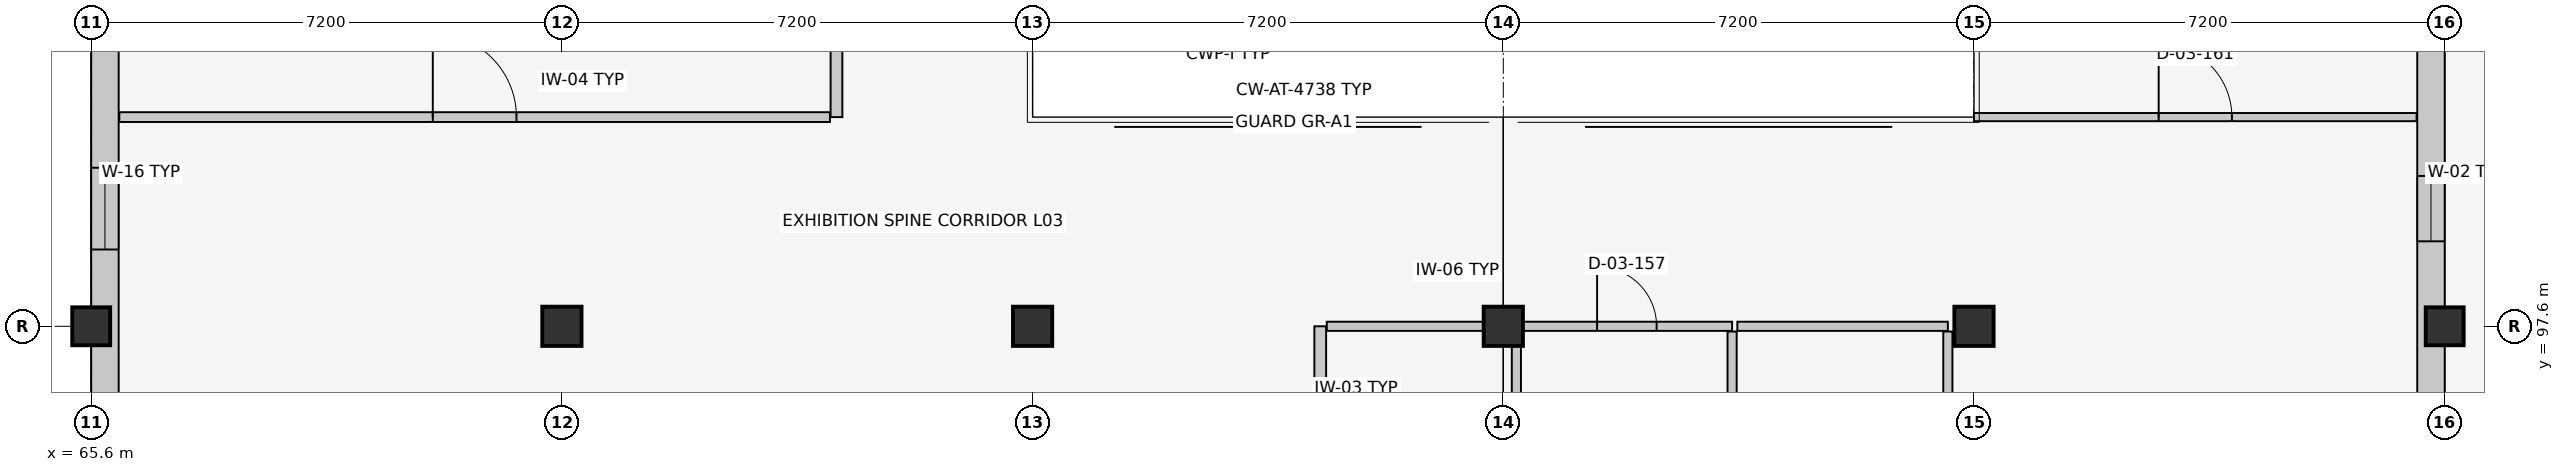
"""IFC4 building model, lengths in metres.
Left out: names, types, materials, properties, quantities, classifications, styles, units other than length and angle.
Written with IfcOpenShell. Run it as: python <this file> out.ifc"""

import sys

from ifc_helpers import new_model, si_unit, direction, frame, frame_2d, origin, origin_2d, place, context, subcontext, project, spatial, rectangle, extrude, element, fill, save


model = new_model("IFC4")
c1 = context("Model", 3, precision=1e-05, world=origin(), true_north=direction((0.0, 1.0)))
c2 = subcontext(c1, "Body", "Model", "MODEL_VIEW")
j1 = project(units=[si_unit("LENGTHUNIT", "METRE"), si_unit("PLANEANGLEUNIT", "RADIAN")], contexts=[c1])
p1 = place(None, origin())
s1 = spatial("IfcSite", under=j1, at=p1, CompositionType="ELEMENT")
p2 = place(p1, origin())
s2 = spatial("IfcBuilding", under=s1, at=p2, CompositionType="ELEMENT")
p3 = place(p2, frame((0.0, 0.0, 13.8)))
s3 = spatial("IfcBuildingStorey", under=s2, at=p3, CompositionType="ELEMENT", Elevation=13.8)
p4 = place(p3, frame((65.6, 97.6, 0.0), z_axis=(0.0, 0.0, 1.0), x_axis=(1.0, 0.0, 0.0)))
e1 = element("IfcColumn", 1, at=p4, inside=s3, PredefinedType="COLUMN", context=c2, shape_type="SweptSolid", body=[
    extrude(rectangle(XDim=0.58, YDim=0.58, at=origin_2d()), origin(), (0.0, 0.0, 1.0), 4.2),
])
for number, where, z_axis, x_axis in (
    (2, (72.8, 97.6, 0.0), (0.0, 0.0, 1.0), (1.0, 0.0, 0.0)),
    (3, (80.0, 97.6, 0.0), (0.0, 0.0, 1.0), (1.0, 0.0, 0.0)),
    (4, (87.2, 97.6, 0.0), (0.0, 0.0, 1.0), (1.0, 0.0, 0.0)),
    (5, (94.4, 97.6, 0.0), (0.0, 0.0, 1.0), (1.0, 0.0, 0.0)),
):
    element("IfcColumn", number, at=place(p3, frame(where, z_axis=z_axis, x_axis=x_axis)), inside=s3, PredefinedType="COLUMN", context=c2, shape_type="SweptSolid", body=[
        extrude(rectangle(XDim=0.6, YDim=0.6, at=origin_2d()), origin(), (0.0, 0.0, 1.0), 4.2),
    ])
p5 = place(p3, frame((101.6, 97.6, 0.0), z_axis=(0.0, 0.0, 1.0), x_axis=(1.0, 0.0, 0.0)))
e6 = element("IfcColumn", 6, at=p5, inside=s3, PredefinedType="COLUMN", context=c2, shape_type="SweptSolid", body=[
    extrude(rectangle(XDim=0.58, YDim=0.58, at=origin_2d()), origin(), (0.0, 0.0, 1.0), 4.2),
])
p6 = place(p3, frame((101.39, 112.0, 0.0), z_axis=(0.0, 0.0, 1.0), x_axis=(0.0, -1.0, 0.0)))
e7 = element("IfcWall", 7, at=p6, inside=s3, PredefinedType="SOLIDWALL", context=c2, shape_type="SweptSolid", body=[
    extrude(rectangle(XDim=21.6, YDim=0.42, at=frame_2d((10.8, 0.0))), origin(), (0.0, 0.0, 1.0), 3.215),
])
p7 = place(p6, frame((17.3, 0.0, 0.0)))
e8 = element("IfcOpeningElement", 8, at=p7, cuts=e7, PredefinedType="OPENING", context=c2, shape_type="SweptSolid", body=[
    extrude(rectangle(XDim=1.4, YDim=2.2, at=frame_2d((0.7, 1.1))), frame((0.0, 0.222, 0.0), z_axis=(0.0, -1.0, 0.0), x_axis=(1.0, 0.0, 0.0)), (0.0, 0.0, 1.0), 0.444),
])
p8 = place(p6, frame((1.08, 0.0, 0.9)))
e9 = element("IfcOpeningElement", 9, at=p8, cuts=e7, PredefinedType="OPENING", context=c2, shape_type="SweptSolid", body=[
    extrude(rectangle(XDim=1.44, YDim=1.75, at=frame_2d((0.72, 0.875))), frame((0.0, 0.222, 0.0), z_axis=(0.0, -1.0, 0.0), x_axis=(1.0, 0.0, 0.0)), (0.0, 0.0, 1.0), 0.444),
])
p9 = place(p6, frame((4.65, 0.0, 0.9)))
e10 = element("IfcOpeningElement", 10, at=p9, cuts=e7, PredefinedType="OPENING", context=c2, shape_type="SweptSolid", body=[
    extrude(rectangle(XDim=1.5, YDim=1.75, at=frame_2d((0.75, 0.875))), frame((0.0, 0.222, 0.0), z_axis=(0.0, -1.0, 0.0), x_axis=(1.0, 0.0, 0.0)), (0.0, 0.0, 1.0), 0.444),
])
p10 = place(p6, frame((8.55, 0.0, 0.9)))
e11 = element("IfcOpeningElement", 11, at=p10, cuts=e7, PredefinedType="OPENING", context=c2, shape_type="SweptSolid", body=[
    extrude(rectangle(XDim=0.9, YDim=1.35, at=frame_2d((0.45, 0.675))), frame((0.0, 0.222, 0.0), z_axis=(0.0, -1.0, 0.0), x_axis=(1.0, 0.0, 0.0)), (0.0, 0.0, 1.0), 0.444),
])
p11 = place(p6, frame((12.1, 0.0, 0.9)))
e12 = element("IfcOpeningElement", 12, at=p11, cuts=e7, PredefinedType="OPENING", context=c2, shape_type="SweptSolid", body=[
    extrude(rectangle(XDim=1.0, YDim=1.35, at=frame_2d((0.5, 0.675))), frame((0.0, 0.222, 0.0), z_axis=(0.0, -1.0, 0.0), x_axis=(1.0, 0.0, 0.0)), (0.0, 0.0, 1.0), 0.444),
])
p12 = place(p3, frame((65.81, 90.4, 0.0), z_axis=(0.0, 0.0, 1.0), x_axis=(0.0, 1.0, 0.0)))
e13 = element("IfcWall", 13, at=p12, inside=s3, PredefinedType="SOLIDWALL", context=c2, shape_type="SweptSolid", body=[
    extrude(rectangle(XDim=21.6, YDim=0.42, at=frame_2d((10.8, 0.0))), origin(), (0.0, 0.0, 1.0), 3.135),
])
p13 = place(p12, frame((1.275, 0.0, 0.9)))
e14 = element("IfcOpeningElement", 14, at=p13, cuts=e13, PredefinedType="OPENING", context=c2, shape_type="SweptSolid", body=[
    extrude(rectangle(XDim=1.05, YDim=1.6, at=frame_2d((0.525, 0.8))), frame((0.0, 0.222, 0.0), z_axis=(0.0, -1.0, 0.0), x_axis=(1.0, 0.0, 0.0)), (0.0, 0.0, 1.0), 0.444),
])
p14 = place(p12, frame((4.825, 0.0, 0.9)))
e15 = element("IfcOpeningElement", 15, at=p14, cuts=e13, PredefinedType="OPENING", context=c2, shape_type="SweptSolid", body=[
    extrude(rectangle(XDim=1.15, YDim=1.6, at=frame_2d((0.575, 0.8))), frame((0.0, 0.222, 0.0), z_axis=(0.0, -1.0, 0.0), x_axis=(1.0, 0.0, 0.0)), (0.0, 0.0, 1.0), 0.444),
])
p15 = place(p12, frame((8.375, 0.0, 0.9)))
e16 = element("IfcOpeningElement", 16, at=p15, cuts=e13, PredefinedType="OPENING", context=c2, shape_type="SweptSolid", body=[
    extrude(rectangle(XDim=1.25, YDim=1.6, at=frame_2d((0.625, 0.8))), frame((0.0, 0.222, 0.0), z_axis=(0.0, -1.0, 0.0), x_axis=(1.0, 0.0, 0.0)), (0.0, 0.0, 1.0), 0.444),
])
p16 = place(p12, frame((11.91, 0.0, 0.9)))
e17 = element("IfcOpeningElement", 17, at=p16, cuts=e13, PredefinedType="OPENING", context=c2, shape_type="SweptSolid", body=[
    extrude(rectangle(XDim=1.38, YDim=1.6, at=frame_2d((0.69, 0.8))), frame((0.0, 0.222, 0.0), z_axis=(0.0, -1.0, 0.0), x_axis=(1.0, 0.0, 0.0)), (0.0, 0.0, 1.0), 0.444),
])
p17 = place(p12, frame((15.45, 0.0, 0.9)))
e18 = element("IfcOpeningElement", 18, at=p17, cuts=e13, PredefinedType="OPENING", context=c2, shape_type="SweptSolid", body=[
    extrude(rectangle(XDim=1.5, YDim=1.6, at=frame_2d((0.75, 0.8))), frame((0.0, 0.222, 0.0), z_axis=(0.0, -1.0, 0.0), x_axis=(1.0, 0.0, 0.0)), (0.0, 0.0, 1.0), 0.444),
])
p18 = place(p12, frame((19.3, 0.0, 0.9)))
e19 = element("IfcOpeningElement", 19, at=p18, cuts=e13, PredefinedType="OPENING", context=c2, shape_type="SweptSolid", body=[
    extrude(rectangle(XDim=1.0, YDim=1.75, at=frame_2d((0.5, 0.875))), frame((0.0, 0.222, 0.0), z_axis=(0.0, -1.0, 0.0), x_axis=(1.0, 0.0, 0.0)), (0.0, 0.0, 1.0), 0.444),
])
p19 = place(p3, frame((84.4, 94.0, 0.0), z_axis=(0.0, 0.0, 1.0), x_axis=(0.0, 1.0, 0.0)))
e20 = element("IfcWall", 20, at=p19, inside=s3, PredefinedType="PARTITIONING", context=c2, shape_type="SweptSolid", body=[
    extrude(rectangle(XDim=3.6, YDim=0.18, at=frame_2d((1.8, 0.0))), origin(), (0.0, 0.0, 1.0), 3.88),
])
p20 = place(p19, frame((1.3, 0.0, 0.0)))
e21 = element("IfcOpeningElement", 21, at=p20, cuts=e20, PredefinedType="OPENING", context=c2, shape_type="SweptSolid", body=[
    extrude(rectangle(XDim=1.0, YDim=2.1, at=frame_2d((0.5, 1.05))), frame((0.0, 0.102, 0.0), z_axis=(0.0, -1.0, 0.0), x_axis=(1.0, 0.0, 0.0)), (0.0, 0.0, 1.0), 0.204),
])
p21 = place(p3, frame((84.5, 97.6, 0.0), z_axis=(0.0, 0.0, 1.0), x_axis=(1.0, 0.0, 0.0)))
e22 = element("IfcWall", 22, at=p21, inside=s3, PredefinedType="PARTITIONING", context=c2, shape_type="SweptSolid", body=[
    extrude(rectangle(XDim=2.9, YDim=0.14, at=frame_2d((1.45, 0.0))), origin(), (0.0, 0.0, 1.0), 3.005),
])
p22 = place(p3, frame((87.4, 90.83, 0.0), z_axis=(0.0, 0.0, 1.0), x_axis=(0.0, 1.0, 0.0)))
e23 = element("IfcWall", 23, at=p22, inside=s3, PredefinedType="PARTITIONING", context=c2, shape_type="SweptSolid", body=[
    extrude(rectangle(XDim=6.69, YDim=0.14, at=frame_2d((3.345, 0.0))), origin(), (0.0, 0.0, 1.0), 3.255),
])
p23 = place(p3, frame((87.48, 97.6, 0.0), z_axis=(0.0, 0.0, 1.0), x_axis=(1.0, 0.0, 0.0)))
e24 = element("IfcWall", 24, at=p23, inside=s3, PredefinedType="PARTITIONING", context=c2, shape_type="SweptSolid", body=[
    extrude(rectangle(XDim=3.22, YDim=0.14, at=frame_2d((1.61, 0.0))), origin(), (0.0, 0.0, 1.0), 3.205),
])
p24 = place(p23, frame((1.155, 0.0, 0.0)))
e25 = element("IfcOpeningElement", 25, at=p24, cuts=e24, PredefinedType="OPENING", context=c2, shape_type="SweptSolid", body=[
    extrude(rectangle(XDim=0.91, YDim=2.06, at=frame_2d((0.455, 1.03))), frame((0.0, 0.082, 0.0), z_axis=(0.0, -1.0, 0.0), x_axis=(1.0, 0.0, 0.0)), (0.0, 0.0, 1.0), 0.164),
])
p25 = place(p3, frame((90.7, 90.83, 0.0), z_axis=(0.0, 0.0, 1.0), x_axis=(0.0, 1.0, 0.0)))
e26 = element("IfcWall", 26, at=p25, inside=s3, PredefinedType="PARTITIONING", context=c2, shape_type="SweptSolid", body=[
    extrude(rectangle(XDim=6.69, YDim=0.14, at=frame_2d((3.345, 0.0))), origin(), (0.0, 0.0, 1.0), 3.595),
])
p26 = place(p3, frame((90.78, 97.6, 0.0), z_axis=(0.0, 0.0, 1.0), x_axis=(1.0, 0.0, 0.0)))
e27 = element("IfcWall", 27, at=p26, inside=s3, PredefinedType="PARTITIONING", context=c2, shape_type="SweptSolid", body=[
    extrude(rectangle(XDim=3.22, YDim=0.14, at=frame_2d((1.61, 0.0))), origin(), (0.0, 0.0, 1.0), 3.205),
])
p27 = place(p3, frame((94.0, 90.83, 0.0), z_axis=(0.0, 0.0, 1.0), x_axis=(0.0, 1.0, 0.0)))
e28 = element("IfcWall", 28, at=p27, inside=s3, PredefinedType="PARTITIONING", context=c2, shape_type="SweptSolid", body=[
    extrude(rectangle(XDim=6.69, YDim=0.14, at=frame_2d((3.345, 0.0))), origin(), (0.0, 0.0, 1.0), 3.88),
])
p28 = place(p27, frame((2.9, 0.0, 0.0)))
e29 = element("IfcOpeningElement", 29, at=p28, cuts=e28, PredefinedType="OPENING", context=c2, shape_type="SweptSolid", body=[
    extrude(rectangle(XDim=0.89, YDim=2.05, at=frame_2d((0.445, 1.025))), frame((0.0, 0.082, 0.0), z_axis=(0.0, -1.0, 0.0), x_axis=(1.0, 0.0, 0.0)), (0.0, 0.0, 1.0), 0.164),
])
p29 = place(p3, frame((77.0, 100.8, 0.0), z_axis=(0.0, 0.0, 1.0), x_axis=(0.0, 1.0, 0.0)))
e30 = element("IfcWall", 30, at=p29, inside=s3, PredefinedType="PARTITIONING", context=c2, shape_type="SweptSolid", body=[
    extrude(rectangle(XDim=10.77, YDim=0.18, at=frame_2d((5.385, 0.0))), origin(), (0.0, 0.0, 1.0), 3.88),
])
p30 = place(p3, frame((66.03, 100.8, 0.0), z_axis=(0.0, 0.0, 1.0), x_axis=(1.0, 0.0, 0.0)))
e31 = element("IfcWall", 31, at=p30, inside=s3, PredefinedType="PARTITIONING", context=c2, shape_type="SweptSolid", body=[
    extrude(rectangle(XDim=10.87, YDim=0.15, at=frame_2d((5.435, 0.0))), origin(), (0.0, 0.0, 1.0), 3.88),
])
p31 = place(p30, frame((4.795, 0.0, 0.0)))
e32 = element("IfcOpeningElement", 32, at=p31, cuts=e31, PredefinedType="OPENING", context=c2, shape_type="SweptSolid", body=[
    extrude(rectangle(XDim=1.28, YDim=2.2, at=frame_2d((0.64, 1.1))), frame((0.0, 0.087, 0.0), z_axis=(0.0, -1.0, 0.0), x_axis=(1.0, 0.0, 0.0)), (0.0, 0.0, 1.0), 0.174),
])
p32 = place(p3, frame((94.4, 100.8, 0.0), z_axis=(0.0, 0.0, 1.0), x_axis=(1.0, 0.0, 0.0)))
e33 = element("IfcWall", 33, at=p32, inside=s3, PredefinedType="PARTITIONING", context=c2, shape_type="SweptSolid", body=[
    extrude(rectangle(XDim=6.77, YDim=0.125, at=frame_2d((3.385, 0.0))), origin(), (0.0, 0.0, 1.0), 3.96),
])
p33 = place(p32, frame((2.825, 0.0, 0.0)))
e34 = element("IfcOpeningElement", 34, at=p33, cuts=e33, PredefinedType="OPENING", context=c2, shape_type="SweptSolid", body=[
    extrude(rectangle(XDim=1.12, YDim=2.15, at=frame_2d((0.56, 1.075))), frame((0.0, 0.074, 0.0), z_axis=(0.0, -1.0, 0.0), x_axis=(1.0, 0.0, 0.0)), (0.0, 0.0, 1.0), 0.149),
])
p34 = place(p11, origin())
e35 = element("IfcWindow", 35, at=p34, inside=s3, PartitioningType="SINGLE_PANEL", PredefinedType="WINDOW", context=c2, shape_type="SweptSolid", body=[
    extrude(rectangle(XDim=1.0, YDim=1.35, at=frame_2d((0.5, 0.675))), frame((0.0, 0.03, 0.0), z_axis=(0.0, -1.0, 0.0), x_axis=(1.0, 0.0, 0.0)), (0.0, 0.0, 1.0), 0.06),
])
fill(e12, e35)
p35 = place(p15, origin())
e36 = element("IfcWindow", 36, at=p35, inside=s3, PartitioningType="SINGLE_PANEL", PredefinedType="WINDOW", context=c2, shape_type="SweptSolid", body=[
    extrude(rectangle(XDim=1.25, YDim=1.6, at=frame_2d((0.625, 0.8))), frame((0.0, 0.03, 0.0), z_axis=(0.0, -1.0, 0.0), x_axis=(1.0, 0.0, 0.0)), (0.0, 0.0, 1.0), 0.06),
])
fill(e16, e36)
p36 = place(p24, origin())
e37 = element("IfcDoor", 37, at=p36, inside=s3, OperationType="SINGLE_SWING_LEFT", PredefinedType="DOOR", context=c2, shape_type="SweptSolid", body=[
    extrude(rectangle(XDim=0.91, YDim=2.06, at=frame_2d((0.455, 1.03))), frame((0.0, 0.025, 0.0), z_axis=(0.0, -1.0, 0.0), x_axis=(1.0, 0.0, 0.0)), (0.0, 0.0, 1.0), 0.05),
])
fill(e25, e37)
p37 = place(p31, origin())
e38 = element("IfcDoor", 38, at=p37, inside=s3, OperationType="SINGLE_SWING_LEFT", PredefinedType="DOOR", context=c2, shape_type="SweptSolid", body=[
    extrude(rectangle(XDim=1.28, YDim=2.2, at=frame_2d((0.64, 1.1))), frame((0.0, 0.025, 0.0), z_axis=(0.0, -1.0, 0.0), x_axis=(1.0, 0.0, 0.0)), (0.0, 0.0, 1.0), 0.05),
])
fill(e32, e38)
p38 = place(p33, origin())
e39 = element("IfcDoor", 39, at=p38, inside=s3, OperationType="SINGLE_SWING_LEFT", PredefinedType="DOOR", context=c2, shape_type="SweptSolid", body=[
    extrude(rectangle(XDim=1.12, YDim=2.15, at=frame_2d((0.56, 1.075))), frame((0.0, 0.025, 0.0), z_axis=(0.0, -1.0, 0.0), x_axis=(1.0, 0.0, 0.0)), (0.0, 0.0, 1.0), 0.05),
])
fill(e34, e39)
save(model, sys.argv[1])
